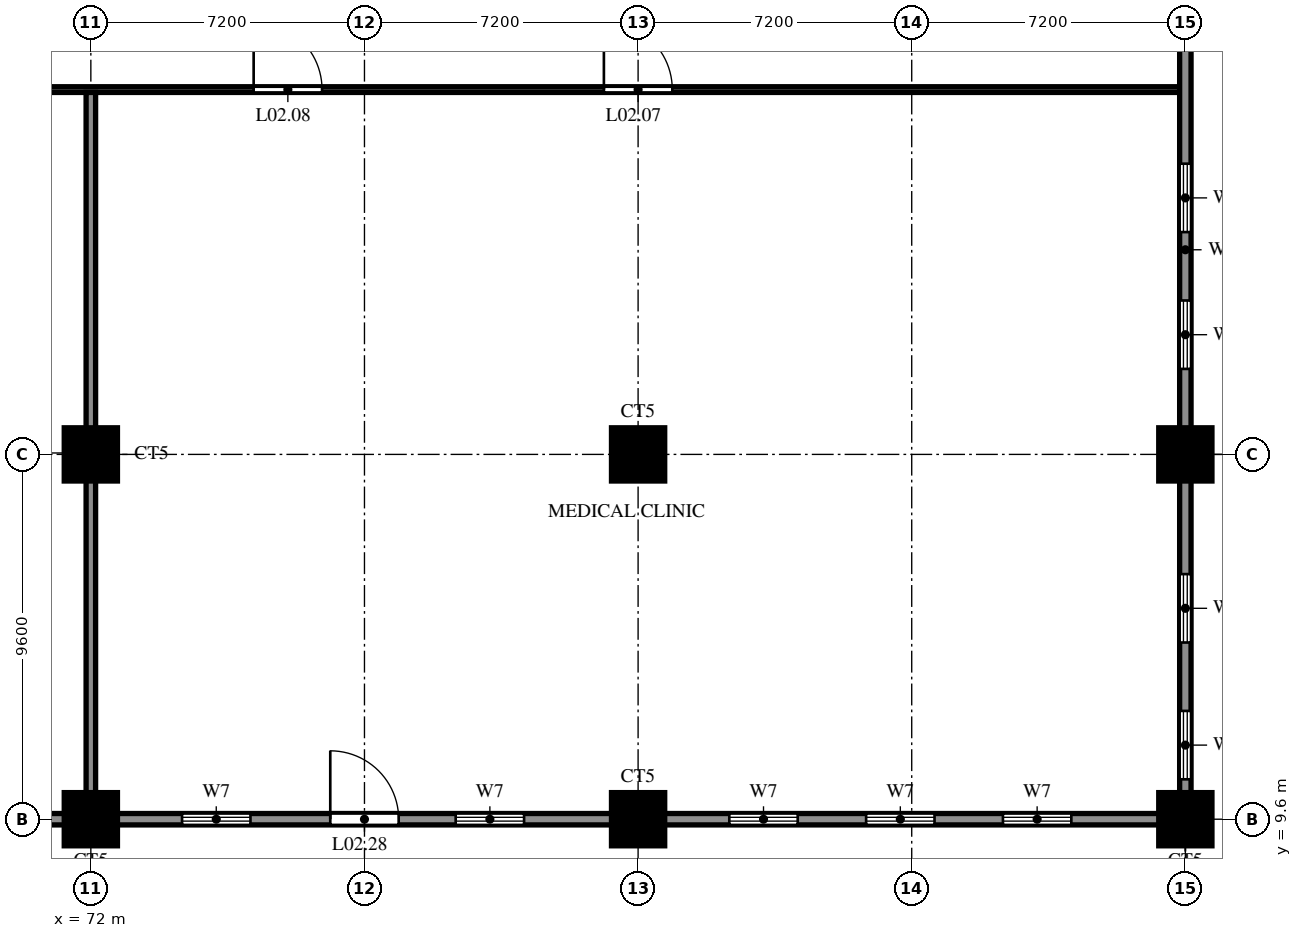
"""IFC4 building model, lengths in metres.
Left out: names, types, materials, properties, quantities, classifications, styles, units other than length and angle.
Written with IfcOpenShell. Run it as: python <this file> out.ifc"""

import sys

from ifc_helpers import new_model, si_unit, direction, frame, frame_2d, origin, origin_2d, place, context, subcontext, project, spatial, rectangle, circle, extrude, source, transform, mapped, element, fill, save


model = new_model("IFC4")
c1 = context("Model", 3, precision=1e-05, world=origin(), true_north=direction((0.0, 1.0)))
c2 = subcontext(c1, "Body", "Model", "MODEL_VIEW")
j1 = project(units=[si_unit("LENGTHUNIT", "METRE"), si_unit("PLANEANGLEUNIT", "RADIAN")], contexts=[c1])
p1 = place(None, origin())
s1 = spatial("IfcSite", under=j1, at=p1, CompositionType="ELEMENT")
p2 = place(p1, origin())
s2 = spatial("IfcBuilding", under=s1, at=p2, CompositionType="ELEMENT")
p3 = place(p2, frame((0.0, 0.0, 13.2)))
s3 = spatial("IfcBuildingStorey", under=s2, at=p3, CompositionType="ELEMENT", Elevation=13.2)
m1 = source(origin(), c2, "Body", "SweptSolid", [
    extrude(circle(Radius=0.7, at=origin_2d()), origin(), (0.0, 0.0, 1.0), 3.8),
])
for number, where, z_axis, x_axis in (
    (1, (72.0, 9.6, 0.0), (0.0, 0.0, 1.0), (1.0, 0.0, 0.0)),
    (2, (86.4, 9.6, 0.0), (0.0, 0.0, 1.0), (1.0, 0.0, 0.0)),
    (3, (100.8, 9.6, 0.0), (0.0, 0.0, 1.0), (1.0, 0.0, 0.0)),
    (4, (72.0, 19.2, 0.0), (0.0, 0.0, 1.0), (1.0, 0.0, 0.0)),
    (5, (86.4, 19.2, 0.0), (0.0, 0.0, 1.0), (1.0, 0.0, 0.0)),
    (6, (100.8, 19.2, 0.0), (0.0, 0.0, 1.0), (1.0, 0.0, 0.0)),
):
    element("IfcColumn", number, at=place(p3, frame(where, z_axis=z_axis, x_axis=x_axis)), inside=s3, PredefinedType="COLUMN", context=c2, shape_type="MappedRepresentation", body=[
        mapped(m1, transform((0.0, 0.0, 0.0))),
    ])
p4 = place(p3, frame((0.0, 9.6, 0.0), z_axis=(0.0, 0.0, 1.0), x_axis=(1.0, 0.0, 0.0)))
e7 = element("IfcWall", 7, at=p4, inside=s3, PredefinedType="SOLIDWALL", context=c2, shape_type="SweptSolid", body=[
    extrude(rectangle(XDim=100.8, YDim=0.3, at=frame_2d((50.4, 0.0))), origin(), (0.0, 0.0, 1.0), 3.8),
])
p5 = place(p4, frame((20.7, 0.0, 0.0)))
e8 = element("IfcOpeningElement", 8, at=p5, cuts=e7, PredefinedType="OPENING", context=c2, shape_type="SweptSolid", body=[
    extrude(rectangle(XDim=1.8, YDim=2.1, at=frame_2d((0.9, 1.05))), frame((0.0, 0.16, 0.0), z_axis=(0.0, -1.0, 0.0), x_axis=(1.0, 0.0, 0.0)), (0.0, 0.0, 1.0), 0.32),
])
p6 = place(p4, frame((49.2, 0.0, 0.0)))
e9 = element("IfcOpeningElement", 9, at=p6, cuts=e7, PredefinedType="OPENING", context=c2, shape_type="SweptSolid", body=[
    extrude(rectangle(XDim=2.4, YDim=2.1, at=frame_2d((1.2, 1.05))), frame((0.0, 0.16, 0.0), z_axis=(0.0, -1.0, 0.0), x_axis=(1.0, 0.0, 0.0)), (0.0, 0.0, 1.0), 0.32),
])
p7 = place(p4, frame((78.3, 0.0, 0.0)))
e10 = element("IfcOpeningElement", 10, at=p7, cuts=e7, PredefinedType="OPENING", context=c2, shape_type="SweptSolid", body=[
    extrude(rectangle(XDim=1.8, YDim=2.1, at=frame_2d((0.9, 1.05))), frame((0.0, 0.16, 0.0), z_axis=(0.0, -1.0, 0.0), x_axis=(1.0, 0.0, 0.0)), (0.0, 0.0, 1.0), 0.32),
])
p8 = place(p4, frame((2.4, 0.0, 0.6)))
e11 = element("IfcOpeningElement", 11, at=p8, cuts=e7, PredefinedType="OPENING", context=c2, shape_type="SweptSolid", body=[
    extrude(rectangle(XDim=1.8, YDim=2.4, at=frame_2d((0.9, 1.2))), frame((0.0, 0.16, 0.0), z_axis=(0.0, -1.0, 0.0), x_axis=(1.0, 0.0, 0.0)), (0.0, 0.0, 1.0), 0.32),
])
p9 = place(p4, frame((6.0, 0.0, 0.6)))
e12 = element("IfcOpeningElement", 12, at=p9, cuts=e7, PredefinedType="OPENING", context=c2, shape_type="SweptSolid", body=[
    extrude(rectangle(XDim=1.8, YDim=2.4, at=frame_2d((0.9, 1.2))), frame((0.0, 0.16, 0.0), z_axis=(0.0, -1.0, 0.0), x_axis=(1.0, 0.0, 0.0)), (0.0, 0.0, 1.0), 0.32),
])
p10 = place(p4, frame((9.6, 0.0, 0.6)))
e13 = element("IfcOpeningElement", 13, at=p10, cuts=e7, PredefinedType="OPENING", context=c2, shape_type="SweptSolid", body=[
    extrude(rectangle(XDim=1.8, YDim=2.4, at=frame_2d((0.9, 1.2))), frame((0.0, 0.16, 0.0), z_axis=(0.0, -1.0, 0.0), x_axis=(1.0, 0.0, 0.0)), (0.0, 0.0, 1.0), 0.32),
])
p11 = place(p4, frame((16.8, 0.0, 0.6)))
e14 = element("IfcOpeningElement", 14, at=p11, cuts=e7, PredefinedType="OPENING", context=c2, shape_type="SweptSolid", body=[
    extrude(rectangle(XDim=1.8, YDim=2.4, at=frame_2d((0.9, 1.2))), frame((0.0, 0.16, 0.0), z_axis=(0.0, -1.0, 0.0), x_axis=(1.0, 0.0, 0.0)), (0.0, 0.0, 1.0), 0.32),
])
p12 = place(p4, frame((24.0, 0.0, 0.6)))
e15 = element("IfcOpeningElement", 15, at=p12, cuts=e7, PredefinedType="OPENING", context=c2, shape_type="SweptSolid", body=[
    extrude(rectangle(XDim=1.8, YDim=2.4, at=frame_2d((0.9, 1.2))), frame((0.0, 0.16, 0.0), z_axis=(0.0, -1.0, 0.0), x_axis=(1.0, 0.0, 0.0)), (0.0, 0.0, 1.0), 0.32),
])
p13 = place(p4, frame((31.2, 0.0, 0.6)))
e16 = element("IfcOpeningElement", 16, at=p13, cuts=e7, PredefinedType="OPENING", context=c2, shape_type="SweptSolid", body=[
    extrude(rectangle(XDim=1.8, YDim=2.4, at=frame_2d((0.9, 1.2))), frame((0.0, 0.16, 0.0), z_axis=(0.0, -1.0, 0.0), x_axis=(1.0, 0.0, 0.0)), (0.0, 0.0, 1.0), 0.32),
])
p14 = place(p4, frame((34.8, 0.0, 0.6)))
e17 = element("IfcOpeningElement", 17, at=p14, cuts=e7, PredefinedType="OPENING", context=c2, shape_type="SweptSolid", body=[
    extrude(rectangle(XDim=1.8, YDim=2.4, at=frame_2d((0.9, 1.2))), frame((0.0, 0.16, 0.0), z_axis=(0.0, -1.0, 0.0), x_axis=(1.0, 0.0, 0.0)), (0.0, 0.0, 1.0), 0.32),
])
p15 = place(p4, frame((38.4, 0.0, 0.6)))
e18 = element("IfcOpeningElement", 18, at=p15, cuts=e7, PredefinedType="OPENING", context=c2, shape_type="SweptSolid", body=[
    extrude(rectangle(XDim=1.8, YDim=2.4, at=frame_2d((0.9, 1.2))), frame((0.0, 0.16, 0.0), z_axis=(0.0, -1.0, 0.0), x_axis=(1.0, 0.0, 0.0)), (0.0, 0.0, 1.0), 0.32),
])
p16 = place(p4, frame((45.6, 0.0, 0.6)))
e19 = element("IfcOpeningElement", 19, at=p16, cuts=e7, PredefinedType="OPENING", context=c2, shape_type="SweptSolid", body=[
    extrude(rectangle(XDim=1.8, YDim=2.4, at=frame_2d((0.9, 1.2))), frame((0.0, 0.16, 0.0), z_axis=(0.0, -1.0, 0.0), x_axis=(1.0, 0.0, 0.0)), (0.0, 0.0, 1.0), 0.32),
])
p17 = place(p4, frame((52.8, 0.0, 0.6)))
e20 = element("IfcOpeningElement", 20, at=p17, cuts=e7, PredefinedType="OPENING", context=c2, shape_type="SweptSolid", body=[
    extrude(rectangle(XDim=1.8, YDim=2.4, at=frame_2d((0.9, 1.2))), frame((0.0, 0.16, 0.0), z_axis=(0.0, -1.0, 0.0), x_axis=(1.0, 0.0, 0.0)), (0.0, 0.0, 1.0), 0.32),
])
p18 = place(p4, frame((60.0, 0.0, 0.6)))
e21 = element("IfcOpeningElement", 21, at=p18, cuts=e7, PredefinedType="OPENING", context=c2, shape_type="SweptSolid", body=[
    extrude(rectangle(XDim=1.8, YDim=2.4, at=frame_2d((0.9, 1.2))), frame((0.0, 0.16, 0.0), z_axis=(0.0, -1.0, 0.0), x_axis=(1.0, 0.0, 0.0)), (0.0, 0.0, 1.0), 0.32),
])
p19 = place(p4, frame((63.6, 0.0, 0.6)))
e22 = element("IfcOpeningElement", 22, at=p19, cuts=e7, PredefinedType="OPENING", context=c2, shape_type="SweptSolid", body=[
    extrude(rectangle(XDim=1.8, YDim=2.4, at=frame_2d((0.9, 1.2))), frame((0.0, 0.16, 0.0), z_axis=(0.0, -1.0, 0.0), x_axis=(1.0, 0.0, 0.0)), (0.0, 0.0, 1.0), 0.32),
])
p20 = place(p4, frame((67.2, 0.0, 0.6)))
e23 = element("IfcOpeningElement", 23, at=p20, cuts=e7, PredefinedType="OPENING", context=c2, shape_type="SweptSolid", body=[
    extrude(rectangle(XDim=1.8, YDim=2.4, at=frame_2d((0.9, 1.2))), frame((0.0, 0.16, 0.0), z_axis=(0.0, -1.0, 0.0), x_axis=(1.0, 0.0, 0.0)), (0.0, 0.0, 1.0), 0.32),
])
p21 = place(p4, frame((74.4, 0.0, 0.6)))
e24 = element("IfcOpeningElement", 24, at=p21, cuts=e7, PredefinedType="OPENING", context=c2, shape_type="SweptSolid", body=[
    extrude(rectangle(XDim=1.8, YDim=2.4, at=frame_2d((0.9, 1.2))), frame((0.0, 0.16, 0.0), z_axis=(0.0, -1.0, 0.0), x_axis=(1.0, 0.0, 0.0)), (0.0, 0.0, 1.0), 0.32),
])
p22 = place(p4, frame((81.6, 0.0, 0.6)))
e25 = element("IfcOpeningElement", 25, at=p22, cuts=e7, PredefinedType="OPENING", context=c2, shape_type="SweptSolid", body=[
    extrude(rectangle(XDim=1.8, YDim=2.4, at=frame_2d((0.9, 1.2))), frame((0.0, 0.16, 0.0), z_axis=(0.0, -1.0, 0.0), x_axis=(1.0, 0.0, 0.0)), (0.0, 0.0, 1.0), 0.32),
])
p23 = place(p4, frame((88.8, 0.0, 0.6)))
e26 = element("IfcOpeningElement", 26, at=p23, cuts=e7, PredefinedType="OPENING", context=c2, shape_type="SweptSolid", body=[
    extrude(rectangle(XDim=1.8, YDim=2.4, at=frame_2d((0.9, 1.2))), frame((0.0, 0.16, 0.0), z_axis=(0.0, -1.0, 0.0), x_axis=(1.0, 0.0, 0.0)), (0.0, 0.0, 1.0), 0.32),
])
p24 = place(p4, frame((92.4, 0.0, 0.6)))
e27 = element("IfcOpeningElement", 27, at=p24, cuts=e7, PredefinedType="OPENING", context=c2, shape_type="SweptSolid", body=[
    extrude(rectangle(XDim=1.8, YDim=2.4, at=frame_2d((0.9, 1.2))), frame((0.0, 0.16, 0.0), z_axis=(0.0, -1.0, 0.0), x_axis=(1.0, 0.0, 0.0)), (0.0, 0.0, 1.0), 0.32),
])
p25 = place(p4, frame((96.0, 0.0, 0.6)))
e28 = element("IfcOpeningElement", 28, at=p25, cuts=e7, PredefinedType="OPENING", context=c2, shape_type="SweptSolid", body=[
    extrude(rectangle(XDim=1.8, YDim=2.4, at=frame_2d((0.9, 1.2))), frame((0.0, 0.16, 0.0), z_axis=(0.0, -1.0, 0.0), x_axis=(1.0, 0.0, 0.0)), (0.0, 0.0, 1.0), 0.32),
])
p26 = place(p3, frame((0.15, 28.8, 0.0), z_axis=(0.0, 0.0, 1.0), x_axis=(1.0, 0.0, 0.0)))
e29 = element("IfcWall", 29, at=p26, inside=s3, PredefinedType="PARTITIONING", context=c2, shape_type="SweptSolid", body=[
    extrude(rectangle(XDim=100.5, YDim=0.15, at=frame_2d((50.25, 0.0))), origin(), (0.0, 0.0, 1.0), 2.6),
])
p27 = place(p26, frame((13.35, 0.0, 0.0)))
e30 = element("IfcOpeningElement", 30, at=p27, cuts=e29, PredefinedType="OPENING", context=c2, shape_type="SweptSolid", body=[
    extrude(rectangle(XDim=1.8, YDim=2.1, at=frame_2d((0.9, 1.05))), frame((0.0, 0.085, 0.0), z_axis=(0.0, -1.0, 0.0), x_axis=(1.0, 0.0, 0.0)), (0.0, 0.0, 1.0), 0.17),
])
p28 = place(p26, frame((4.134, 0.0, 0.0)))
e31 = element("IfcOpeningElement", 31, at=p28, cuts=e29, PredefinedType="OPENING", context=c2, shape_type="SweptSolid", body=[
    extrude(rectangle(XDim=1.8, YDim=2.1, at=frame_2d((0.9, 1.05))), frame((0.0, 0.085, 0.0), z_axis=(0.0, -1.0, 0.0), x_axis=(1.0, 0.0, 0.0)), (0.0, 0.0, 1.0), 0.17),
])
p29 = place(p26, frame((34.95, 0.0, 0.0)))
e32 = element("IfcOpeningElement", 32, at=p29, cuts=e29, PredefinedType="OPENING", context=c2, shape_type="SweptSolid", body=[
    extrude(rectangle(XDim=1.8, YDim=2.1, at=frame_2d((0.9, 1.05))), frame((0.0, 0.085, 0.0), z_axis=(0.0, -1.0, 0.0), x_axis=(1.0, 0.0, 0.0)), (0.0, 0.0, 1.0), 0.17),
])
p30 = place(p26, frame((30.342, 0.0, 0.0)))
e33 = element("IfcOpeningElement", 33, at=p30, cuts=e29, PredefinedType="OPENING", context=c2, shape_type="SweptSolid", body=[
    extrude(rectangle(XDim=1.8, YDim=2.1, at=frame_2d((0.9, 1.05))), frame((0.0, 0.085, 0.0), z_axis=(0.0, -1.0, 0.0), x_axis=(1.0, 0.0, 0.0)), (0.0, 0.0, 1.0), 0.17),
])
p31 = place(p26, frame((56.55, 0.0, 0.0)))
e34 = element("IfcOpeningElement", 34, at=p31, cuts=e29, PredefinedType="OPENING", context=c2, shape_type="SweptSolid", body=[
    extrude(rectangle(XDim=1.8, YDim=2.1, at=frame_2d((0.9, 1.05))), frame((0.0, 0.085, 0.0), z_axis=(0.0, -1.0, 0.0), x_axis=(1.0, 0.0, 0.0)), (0.0, 0.0, 1.0), 0.17),
])
p32 = place(p26, frame((47.334, 0.0, 0.0)))
e35 = element("IfcOpeningElement", 35, at=p32, cuts=e29, PredefinedType="OPENING", context=c2, shape_type="SweptSolid", body=[
    extrude(rectangle(XDim=1.8, YDim=2.1, at=frame_2d((0.9, 1.05))), frame((0.0, 0.085, 0.0), z_axis=(0.0, -1.0, 0.0), x_axis=(1.0, 0.0, 0.0)), (0.0, 0.0, 1.0), 0.17),
])
p33 = place(p26, frame((85.35, 0.0, 0.0)))
e36 = element("IfcOpeningElement", 36, at=p33, cuts=e29, PredefinedType="OPENING", context=c2, shape_type="SweptSolid", body=[
    extrude(rectangle(XDim=1.8, YDim=2.1, at=frame_2d((0.9, 1.05))), frame((0.0, 0.085, 0.0), z_axis=(0.0, -1.0, 0.0), x_axis=(1.0, 0.0, 0.0)), (0.0, 0.0, 1.0), 0.17),
])
p34 = place(p26, frame((76.134, 0.0, 0.0)))
e37 = element("IfcOpeningElement", 37, at=p34, cuts=e29, PredefinedType="OPENING", context=c2, shape_type="SweptSolid", body=[
    extrude(rectangle(XDim=1.8, YDim=2.1, at=frame_2d((0.9, 1.05))), frame((0.0, 0.085, 0.0), z_axis=(0.0, -1.0, 0.0), x_axis=(1.0, 0.0, 0.0)), (0.0, 0.0, 1.0), 0.17),
])
p35 = place(p3, frame((72.0, 9.75, 0.0), z_axis=(0.0, 0.0, 1.0), x_axis=(0.0, 1.0, 0.0)))
e38 = element("IfcWall", 38, at=p35, inside=s3, PredefinedType="SOLIDWALL", context=c2, shape_type="SweptSolid", body=[
    extrude(rectangle(XDim=18.975, YDim=0.25, at=frame_2d((9.488, 0.0))), origin(), (0.0, 0.0, 1.0), 2.6),
])
p36 = place(p3, frame((100.8, 9.6, 0.0), z_axis=(0.0, 0.0, 1.0), x_axis=(0.0, 1.0, 0.0)))
e39 = element("IfcWall", 39, at=p36, inside=s3, PredefinedType="SOLIDWALL", context=c2, shape_type="SweptSolid", body=[
    extrude(rectangle(XDim=33.3, YDim=0.3, at=frame_2d((16.65, 0.0))), origin(), (0.0, 0.0, 1.0), 3.8),
])
p37 = place(p36, frame((1.05, 0.0, 0.6)))
e40 = element("IfcOpeningElement", 40, at=p37, cuts=e39, PredefinedType="OPENING", context=c2, shape_type="SweptSolid", body=[
    extrude(rectangle(XDim=1.8, YDim=2.4, at=frame_2d((0.9, 1.2))), frame((0.0, 0.16, 0.0), z_axis=(0.0, -1.0, 0.0), x_axis=(1.0, 0.0, 0.0)), (0.0, 0.0, 1.0), 0.32),
])
p38 = place(p36, frame((4.65, 0.0, 0.6)))
e41 = element("IfcOpeningElement", 41, at=p38, cuts=e39, PredefinedType="OPENING", context=c2, shape_type="SweptSolid", body=[
    extrude(rectangle(XDim=1.8, YDim=2.4, at=frame_2d((0.9, 1.2))), frame((0.0, 0.16, 0.0), z_axis=(0.0, -1.0, 0.0), x_axis=(1.0, 0.0, 0.0)), (0.0, 0.0, 1.0), 0.32),
])
p39 = place(p36, frame((11.85, 0.0, 0.6)))
e42 = element("IfcOpeningElement", 42, at=p39, cuts=e39, PredefinedType="OPENING", context=c2, shape_type="SweptSolid", body=[
    extrude(rectangle(XDim=1.8, YDim=2.4, at=frame_2d((0.9, 1.2))), frame((0.0, 0.16, 0.0), z_axis=(0.0, -1.0, 0.0), x_axis=(1.0, 0.0, 0.0)), (0.0, 0.0, 1.0), 0.32),
])
p40 = place(p36, frame((15.45, 0.0, 0.6)))
e43 = element("IfcOpeningElement", 43, at=p40, cuts=e39, PredefinedType="OPENING", context=c2, shape_type="SweptSolid", body=[
    extrude(rectangle(XDim=1.8, YDim=2.4, at=frame_2d((0.9, 1.2))), frame((0.0, 0.16, 0.0), z_axis=(0.0, -1.0, 0.0), x_axis=(1.0, 0.0, 0.0)), (0.0, 0.0, 1.0), 0.32),
])
p41 = place(p36, frame((26.25, 0.0, 0.6)))
e44 = element("IfcOpeningElement", 44, at=p41, cuts=e39, PredefinedType="OPENING", context=c2, shape_type="SweptSolid", body=[
    extrude(rectangle(XDim=1.8, YDim=2.4, at=frame_2d((0.9, 1.2))), frame((0.0, 0.16, 0.0), z_axis=(0.0, -1.0, 0.0), x_axis=(1.0, 0.0, 0.0)), (0.0, 0.0, 1.0), 0.32),
])
p42 = place(p36, frame((29.85, 0.0, 0.6)))
e45 = element("IfcOpeningElement", 45, at=p42, cuts=e39, PredefinedType="OPENING", context=c2, shape_type="SweptSolid", body=[
    extrude(rectangle(XDim=1.8, YDim=2.4, at=frame_2d((0.9, 1.2))), frame((0.0, 0.16, 0.0), z_axis=(0.0, -1.0, 0.0), x_axis=(1.0, 0.0, 0.0)), (0.0, 0.0, 1.0), 0.32),
])
p43 = place(p33, origin())
e46 = element("IfcDoor", 46, at=p43, inside=s3, OperationType="DOUBLE_DOOR_SINGLE_SWING", PredefinedType="DOOR", context=c2, shape_type="SweptSolid", body=[
    extrude(rectangle(XDim=1.8, YDim=2.1, at=frame_2d((0.9, 1.05))), frame((0.0, 0.025, 0.0), z_axis=(0.0, -1.0, 0.0), x_axis=(1.0, 0.0, 0.0)), (0.0, 0.0, 1.0), 0.05),
])
fill(e36, e46)
p44 = place(p34, origin())
e47 = element("IfcDoor", 47, at=p44, inside=s3, OperationType="DOUBLE_DOOR_SINGLE_SWING", PredefinedType="DOOR", context=c2, shape_type="SweptSolid", body=[
    extrude(rectangle(XDim=1.8, YDim=2.1, at=frame_2d((0.9, 1.05))), frame((0.0, 0.025, 0.0), z_axis=(0.0, -1.0, 0.0), x_axis=(1.0, 0.0, 0.0)), (0.0, 0.0, 1.0), 0.05),
])
fill(e37, e47)
p45 = place(p7, origin())
e48 = element("IfcDoor", 48, at=p45, inside=s3, OperationType="DOUBLE_DOOR_SINGLE_SWING", PredefinedType="DOOR", context=c2, shape_type="SweptSolid", body=[
    extrude(rectangle(XDim=1.8, YDim=2.1, at=frame_2d((0.9, 1.05))), frame((0.0, 0.025, 0.0), z_axis=(0.0, -1.0, 0.0), x_axis=(1.0, 0.0, 0.0)), (0.0, 0.0, 1.0), 0.05),
])
fill(e10, e48)
p46 = place(p21, origin())
e49 = element("IfcWindow", 49, at=p46, inside=s3, PartitioningType="DOUBLE_PANEL_VERTICAL", PredefinedType="WINDOW", context=c2, shape_type="SweptSolid", body=[
    extrude(rectangle(XDim=1.8, YDim=2.4, at=frame_2d((0.9, 1.2))), frame((0.0, 0.03, 0.0), z_axis=(0.0, -1.0, 0.0), x_axis=(1.0, 0.0, 0.0)), (0.0, 0.0, 1.0), 0.06),
])
fill(e24, e49)
p47 = place(p22, origin())
e50 = element("IfcWindow", 50, at=p47, inside=s3, PartitioningType="DOUBLE_PANEL_VERTICAL", PredefinedType="WINDOW", context=c2, shape_type="SweptSolid", body=[
    extrude(rectangle(XDim=1.8, YDim=2.4, at=frame_2d((0.9, 1.2))), frame((0.0, 0.03, 0.0), z_axis=(0.0, -1.0, 0.0), x_axis=(1.0, 0.0, 0.0)), (0.0, 0.0, 1.0), 0.06),
])
fill(e25, e50)
p48 = place(p23, origin())
e51 = element("IfcWindow", 51, at=p48, inside=s3, PartitioningType="DOUBLE_PANEL_VERTICAL", PredefinedType="WINDOW", context=c2, shape_type="SweptSolid", body=[
    extrude(rectangle(XDim=1.8, YDim=2.4, at=frame_2d((0.9, 1.2))), frame((0.0, 0.03, 0.0), z_axis=(0.0, -1.0, 0.0), x_axis=(1.0, 0.0, 0.0)), (0.0, 0.0, 1.0), 0.06),
])
fill(e26, e51)
p49 = place(p24, origin())
e52 = element("IfcWindow", 52, at=p49, inside=s3, PartitioningType="DOUBLE_PANEL_VERTICAL", PredefinedType="WINDOW", context=c2, shape_type="SweptSolid", body=[
    extrude(rectangle(XDim=1.8, YDim=2.4, at=frame_2d((0.9, 1.2))), frame((0.0, 0.03, 0.0), z_axis=(0.0, -1.0, 0.0), x_axis=(1.0, 0.0, 0.0)), (0.0, 0.0, 1.0), 0.06),
])
fill(e27, e52)
p50 = place(p25, origin())
e53 = element("IfcWindow", 53, at=p50, inside=s3, PartitioningType="DOUBLE_PANEL_VERTICAL", PredefinedType="WINDOW", context=c2, shape_type="SweptSolid", body=[
    extrude(rectangle(XDim=1.8, YDim=2.4, at=frame_2d((0.9, 1.2))), frame((0.0, 0.03, 0.0), z_axis=(0.0, -1.0, 0.0), x_axis=(1.0, 0.0, 0.0)), (0.0, 0.0, 1.0), 0.06),
])
fill(e28, e53)
p51 = place(p37, origin())
e54 = element("IfcWindow", 54, at=p51, inside=s3, PartitioningType="DOUBLE_PANEL_VERTICAL", PredefinedType="WINDOW", context=c2, shape_type="SweptSolid", body=[
    extrude(rectangle(XDim=1.8, YDim=2.4, at=frame_2d((0.9, 1.2))), frame((0.0, 0.03, 0.0), z_axis=(0.0, -1.0, 0.0), x_axis=(1.0, 0.0, 0.0)), (0.0, 0.0, 1.0), 0.06),
])
fill(e40, e54)
p52 = place(p38, origin())
e55 = element("IfcWindow", 55, at=p52, inside=s3, PartitioningType="DOUBLE_PANEL_VERTICAL", PredefinedType="WINDOW", context=c2, shape_type="SweptSolid", body=[
    extrude(rectangle(XDim=1.8, YDim=2.4, at=frame_2d((0.9, 1.2))), frame((0.0, 0.03, 0.0), z_axis=(0.0, -1.0, 0.0), x_axis=(1.0, 0.0, 0.0)), (0.0, 0.0, 1.0), 0.06),
])
fill(e41, e55)
p53 = place(p39, origin())
e56 = element("IfcWindow", 56, at=p53, inside=s3, PartitioningType="DOUBLE_PANEL_VERTICAL", PredefinedType="WINDOW", context=c2, shape_type="SweptSolid", body=[
    extrude(rectangle(XDim=1.8, YDim=2.4, at=frame_2d((0.9, 1.2))), frame((0.0, 0.03, 0.0), z_axis=(0.0, -1.0, 0.0), x_axis=(1.0, 0.0, 0.0)), (0.0, 0.0, 1.0), 0.06),
])
fill(e42, e56)
p54 = place(p40, origin())
e57 = element("IfcWindow", 57, at=p54, inside=s3, PartitioningType="DOUBLE_PANEL_VERTICAL", PredefinedType="WINDOW", context=c2, shape_type="SweptSolid", body=[
    extrude(rectangle(XDim=1.8, YDim=2.4, at=frame_2d((0.9, 1.2))), frame((0.0, 0.03, 0.0), z_axis=(0.0, -1.0, 0.0), x_axis=(1.0, 0.0, 0.0)), (0.0, 0.0, 1.0), 0.06),
])
fill(e43, e57)
save(model, sys.argv[1])
